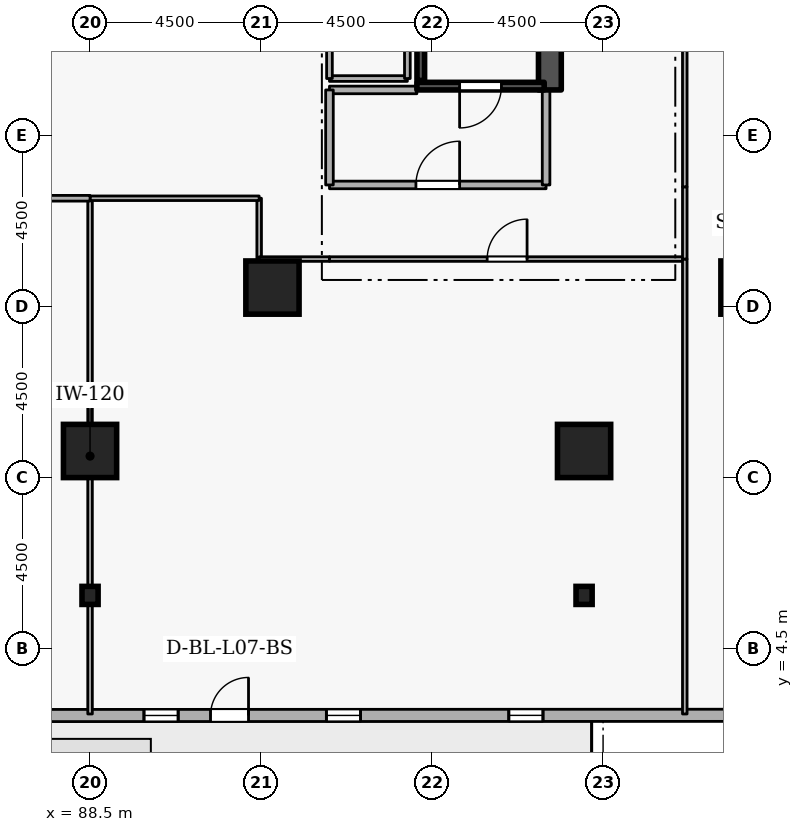
"""IFC4 building model, lengths in metres.
Left out: names, types, materials, properties, quantities, classifications, styles, units other than length and angle.
Written with IfcOpenShell. Run it as: python <this file> out.ifc"""

import sys

from ifc_helpers import new_model, si_unit, direction, frame, frame_2d, origin, origin_2d, place, context, subcontext, project, spatial, rectangle, i_section, extrude, element, fill, save


model = new_model("IFC4")
c1 = context("Model", 3, precision=1e-05, world=origin(), true_north=direction((0.0, 1.0)))
c2 = subcontext(c1, "Body", "Model", "MODEL_VIEW")
j1 = project(units=[si_unit("LENGTHUNIT", "METRE"), si_unit("PLANEANGLEUNIT", "RADIAN")], contexts=[c1])
p1 = place(None, origin())
s1 = spatial("IfcSite", under=j1, at=p1, CompositionType="ELEMENT")
p2 = place(p1, origin())
s2 = spatial("IfcBuilding", under=s1, at=p2, CompositionType="ELEMENT")
p3 = place(p2, frame((0.0, 0.0, 31.5)))
s3 = spatial("IfcBuildingStorey", under=s2, at=p3, CompositionType="ELEMENT", Elevation=31.5)
p4 = place(p3, frame((100.6, 19.2, 0.0), z_axis=(0.0, 0.0, 1.0), x_axis=(0.0, 1.0, 0.0)))
e1 = element("IfcWall", 1, at=p4, inside=s3, PredefinedType="SHEAR", context=c2, shape_type="SweptSolid", body=[
    extrude(rectangle(XDim=15.6, YDim=0.6, at=frame_2d((7.8, 0.0))), origin(), (0.0, 0.0, 1.0), 3.6),
])
for number, where, z_axis, x_axis in (
    (2, (105.8, 14.0, 0.0), (0.0, 0.0, 1.0), (1.0, 0.0, 0.0)),
    (3, (101.5, 9.7, 0.0), (0.0, 0.0, 1.0), (1.0, 0.0, 0.0)),
    (4, (88.5, 9.7, 0.0), (0.0, 0.0, 1.0), (1.0, 0.0, 0.0)),
    (5, (93.3, 14.0, 0.0), (0.0, 0.0, 1.0), (1.0, 0.0, 0.0)),
):
    element("IfcColumn", number, at=place(p3, frame(where, z_axis=z_axis, x_axis=x_axis)), inside=s3, PredefinedType="COLUMN", context=c2, shape_type="SweptSolid", body=[
        extrude(rectangle(XDim=1.4, YDim=1.4, at=origin_2d()), origin(), (0.0, 0.0, 1.0), 3.6),
    ])
for number, where, z_axis, x_axis in (
    (6, (101.5, 5.9, 0.0), (0.0, 0.0, 1.0), (1.0, 0.0, 0.0)),
    (7, (88.5, 5.9, 0.0), (0.0, 0.0, 1.0), (1.0, 0.0, 0.0)),
):
    element("IfcColumn", number, at=place(p3, frame(where, z_axis=z_axis, x_axis=x_axis)), inside=s3, PredefinedType="COLUMN", context=c2, shape_type="SweptSolid", body=[
        extrude(i_section(OverallWidth=0.424, OverallDepth=0.475, WebThickness=0.048, FlangeThickness=0.077, FilletRadius=0.015, at=origin_2d()), origin(), (0.0, 0.0, 1.0), 3.6),
    ])
p5 = place(p3, frame((72.819, 2.735, 0.0), z_axis=(0.0, 0.0, 1.0), x_axis=(0.999999952618, 0.000307837676, 0.0)))
e8 = element("IfcWall", 8, at=p5, inside=s3, PredefinedType="STANDARD", context=c2, shape_type="SweptSolid", body=[
    extrude(rectangle(XDim=34.103, YDim=0.32, at=frame_2d((17.051, 0.0))), origin(), (0.0, 0.0, 1.0), 2.7),
])
p6 = place(p5, frame((18.851, 0.0, 0.0)))
e9 = element("IfcOpeningElement", 9, at=p6, cuts=e8, PredefinedType="OPENING", context=c2, shape_type="SweptSolid", body=[
    extrude(rectangle(XDim=1.0, YDim=2.08, at=frame_2d((0.5, 1.04))), frame((0.0, 0.17, 0.0), z_axis=(0.0, -1.0, 0.0), x_axis=(1.0, 0.0, 0.0)), (0.0, 0.0, 1.0), 0.34),
])
p7 = place(p5, frame((2.7, 0.0, 0.72)))
e10 = element("IfcOpeningElement", 10, at=p7, cuts=e8, PredefinedType="OPENING", context=c2, shape_type="SweptSolid", body=[
    extrude(rectangle(XDim=0.9, YDim=1.75, at=frame_2d((0.45, 0.875))), frame((0.0, 0.17, 0.0), z_axis=(0.0, -1.0, 0.0), x_axis=(1.0, 0.0, 0.0)), (0.0, 0.0, 1.0), 0.34),
])
p8 = place(p5, frame((7.5, 0.0, 0.72)))
e11 = element("IfcOpeningElement", 11, at=p8, cuts=e8, PredefinedType="OPENING", context=c2, shape_type="SweptSolid", body=[
    extrude(rectangle(XDim=0.9, YDim=1.75, at=frame_2d((0.45, 0.875))), frame((0.0, 0.17, 0.0), z_axis=(0.0, -1.0, 0.0), x_axis=(1.0, 0.0, 0.0)), (0.0, 0.0, 1.0), 0.34),
])
p9 = place(p5, frame((12.3, 0.0, 0.72)))
e12 = element("IfcOpeningElement", 12, at=p9, cuts=e8, PredefinedType="OPENING", context=c2, shape_type="SweptSolid", body=[
    extrude(rectangle(XDim=0.9, YDim=1.75, at=frame_2d((0.45, 0.875))), frame((0.0, 0.17, 0.0), z_axis=(0.0, -1.0, 0.0), x_axis=(1.0, 0.0, 0.0)), (0.0, 0.0, 1.0), 0.34),
])
p10 = place(p5, frame((17.1, 0.0, 0.72)))
e13 = element("IfcOpeningElement", 13, at=p10, cuts=e8, PredefinedType="OPENING", context=c2, shape_type="SweptSolid", body=[
    extrude(rectangle(XDim=0.9, YDim=1.75, at=frame_2d((0.45, 0.875))), frame((0.0, 0.17, 0.0), z_axis=(0.0, -1.0, 0.0), x_axis=(1.0, 0.0, 0.0)), (0.0, 0.0, 1.0), 0.34),
])
p11 = place(p5, frame((21.9, 0.0, 0.72)))
e14 = element("IfcOpeningElement", 14, at=p11, cuts=e8, PredefinedType="OPENING", context=c2, shape_type="SweptSolid", body=[
    extrude(rectangle(XDim=0.9, YDim=1.75, at=frame_2d((0.45, 0.875))), frame((0.0, 0.17, 0.0), z_axis=(0.0, -1.0, 0.0), x_axis=(1.0, 0.0, 0.0)), (0.0, 0.0, 1.0), 0.34),
])
p12 = place(p5, frame((26.7, 0.0, 0.72)))
e15 = element("IfcOpeningElement", 15, at=p12, cuts=e8, PredefinedType="OPENING", context=c2, shape_type="SweptSolid", body=[
    extrude(rectangle(XDim=0.9, YDim=1.75, at=frame_2d((0.45, 0.875))), frame((0.0, 0.17, 0.0), z_axis=(0.0, -1.0, 0.0), x_axis=(1.0, 0.0, 0.0)), (0.0, 0.0, 1.0), 0.34),
])
p13 = place(p3, frame((100.45, 19.3, 0.0), z_axis=(0.0, 0.0, 1.0), x_axis=(-1.0, 0.0, 0.0)))
e16 = element("IfcWall", 16, at=p13, inside=s3, PredefinedType="SHEAR", context=c2, shape_type="SweptSolid", body=[
    extrude(rectangle(XDim=3.35, YDim=0.2, at=frame_2d((1.675, 0.0))), origin(), (0.0, 0.0, 1.0), 3.6),
])
p14 = place(p13, frame((1.125, 0.0, 0.0)))
e17 = element("IfcOpeningElement", 17, at=p14, cuts=e16, PredefinedType="OPENING", context=c2, shape_type="SweptSolid", body=[
    extrude(rectangle(XDim=1.1, YDim=2.1, at=frame_2d((0.55, 1.05))), frame((0.0, 0.11, 0.0), z_axis=(0.0, -1.0, 0.0), x_axis=(1.0, 0.0, 0.0)), (0.0, 0.0, 1.0), 0.22),
])
p15 = place(p3, frame((97.203, 26.55, 0.0), z_axis=(0.0, 0.0, 1.0), x_axis=(0.0, -1.0, 0.0)))
e18 = element("IfcWall", 18, at=p15, inside=s3, PredefinedType="SHEAR", context=c2, shape_type="SweptSolid", body=[
    extrude(rectangle(XDim=7.1, YDim=0.2, at=frame_2d((3.55, 0.0))), origin(), (0.0, 0.0, 1.0), 3.6),
])
p16 = place(p3, frame((94.8, 16.7, 0.0), z_axis=(0.0, 0.0, 1.0), x_axis=(1.0, 0.0, 0.0)))
e19 = element("IfcWall", 19, at=p16, inside=s3, PredefinedType="STANDARD", context=c2, shape_type="SweptSolid", body=[
    extrude(rectangle(XDim=5.7, YDim=0.2, at=frame_2d((2.85, 0.0))), origin(), (0.0, 0.0, 1.0), 3.34),
])
p17 = place(p16, frame((2.275, 0.0, 0.0)))
e20 = element("IfcOpeningElement", 20, at=p17, cuts=e19, PredefinedType="OPENING", context=c2, shape_type="SweptSolid", body=[
    extrude(rectangle(XDim=1.15, YDim=2.1, at=frame_2d((0.575, 1.05))), frame((0.0, 0.11, 0.0), z_axis=(0.0, -1.0, 0.0), x_axis=(1.0, 0.0, 0.0)), (0.0, 0.0, 1.0), 0.22),
])
p18 = place(p3, frame((100.5, 16.7, 0.0), z_axis=(0.0, 0.0, 1.0), x_axis=(0.0, 1.0, 0.0)))
e21 = element("IfcWall", 21, at=p18, inside=s3, PredefinedType="STANDARD", context=c2, shape_type="SweptSolid", body=[
    extrude(rectangle(XDim=2.5, YDim=0.2, at=frame_2d((1.25, 0.0))), origin(), (0.0, 0.0, 1.0), 3.34),
])
p19 = place(p3, frame((97.1, 19.2, 0.0), z_axis=(0.0, 0.0, 1.0), x_axis=(-1.0, 0.0, 0.0)))
e22 = element("IfcWall", 22, at=p19, inside=s3, PredefinedType="STANDARD", context=c2, shape_type="SweptSolid", body=[
    extrude(rectangle(XDim=2.3, YDim=0.2, at=frame_2d((1.15, 0.0))), origin(), (0.0, 0.0, 1.0), 2.545),
])
p20 = place(p3, frame((94.8, 19.2, 0.0), z_axis=(0.0, 0.0, 1.0), x_axis=(0.0, -1.0, 0.0)))
e23 = element("IfcWall", 23, at=p20, inside=s3, PredefinedType="STANDARD", context=c2, shape_type="SweptSolid", body=[
    extrude(rectangle(XDim=2.5, YDim=0.2, at=frame_2d((1.25, 0.0))), origin(), (0.0, 0.0, 1.0), 3.34),
])
p21 = place(p3, frame((94.8, 19.5, 0.0), z_axis=(0.0, 0.0, 1.0), x_axis=(1.0, 0.0, 0.0)))
e24 = element("IfcWall", 24, at=p21, inside=s3, PredefinedType="PARTITIONING", context=c2, shape_type="SweptSolid", body=[
    extrude(rectangle(XDim=2.05, YDim=0.15, at=frame_2d((1.025, 0.0))), origin(), (0.0, 0.0, 1.0), 2.545),
])
p22 = place(p3, frame((96.85, 19.5, 0.0), z_axis=(0.0, 0.0, 1.0), x_axis=(0.0, 1.0, 0.0)))
e25 = element("IfcWall", 25, at=p22, inside=s3, PredefinedType="PARTITIONING", context=c2, shape_type="SweptSolid", body=[
    extrude(rectangle(XDim=2.6, YDim=0.15, at=frame_2d((1.3, 0.0))), origin(), (0.0, 0.0, 1.0), 3.34),
])
p23 = place(p3, frame((94.8, 22.1, 0.0), z_axis=(0.0, 0.0, 1.0), x_axis=(0.0, -1.0, 0.0)))
e26 = element("IfcWall", 26, at=p23, inside=s3, PredefinedType="PARTITIONING", context=c2, shape_type="SweptSolid", body=[
    extrude(rectangle(XDim=2.6, YDim=0.15, at=frame_2d((1.3, 0.0))), origin(), (0.0, 0.0, 1.0), 3.34),
])
p24 = place(p23, frame((0.84, 0.0, 0.0)))
e27 = element("IfcOpeningElement", 27, at=p24, cuts=e26, PredefinedType="OPENING", context=c2, shape_type="SweptSolid", body=[
    extrude(rectangle(XDim=0.92, YDim=2.08, at=frame_2d((0.46, 1.04))), frame((0.0, 0.085, 0.0), z_axis=(0.0, -1.0, 0.0), x_axis=(1.0, 0.0, 0.0)), (0.0, 0.0, 1.0), 0.17),
])
p25 = place(p3, frame((92.95, 16.35, 0.0), z_axis=(0.0, 0.0, 1.0), x_axis=(0.0, -1.0, 0.0)))
e28 = element("IfcWall", 28, at=p25, inside=s3, PredefinedType="PARTITIONING", context=c2, shape_type="SweptSolid", body=[
    extrude(rectangle(XDim=1.6, YDim=0.12, at=frame_2d((0.8, 0.0))), origin(), (0.0, 0.0, 1.0), 3.34),
])
p26 = place(p3, frame((92.95, 14.75, 0.0), z_axis=(0.0, 0.0, 1.0), x_axis=(1.0, 0.0, 0.0)))
e29 = element("IfcWall", 29, at=p26, inside=s3, PredefinedType="PARTITIONING", context=c2, shape_type="SweptSolid", body=[
    extrude(rectangle(XDim=1.85, YDim=0.12, at=frame_2d((0.925, 0.0))), origin(), (0.0, 0.0, 1.0), 3.34),
])
p27 = place(p3, frame((94.8, 14.75, 0.0), z_axis=(0.0, 0.0, 1.0), x_axis=(1.0, 0.0, 0.0)))
e30 = element("IfcWall", 30, at=p27, inside=s3, PredefinedType="PARTITIONING", context=c2, shape_type="SweptSolid", body=[
    extrude(rectangle(XDim=9.35, YDim=0.12, at=frame_2d((4.675, 0.0))), origin(), (0.0, 0.0, 1.0), 3.34),
])
p28 = place(p27, frame((4.15, 0.0, 0.0)))
e31 = element("IfcOpeningElement", 31, at=p28, cuts=e30, PredefinedType="OPENING", context=c2, shape_type="SweptSolid", body=[
    extrude(rectangle(XDim=1.05, YDim=2.1, at=frame_2d((0.525, 1.05))), frame((0.0, 0.07, 0.0), z_axis=(0.0, -1.0, 0.0), x_axis=(1.0, 0.0, 0.0)), (0.0, 0.0, 1.0), 0.14),
])
p29 = place(p3, frame((104.15, 14.75, 0.0), z_axis=(0.0, 0.0, 1.0), x_axis=(0.0, -1.0, 0.0)))
e32 = element("IfcWall", 32, at=p29, inside=s3, PredefinedType="PARTITIONING", context=c2, shape_type="SweptSolid", body=[
    extrude(rectangle(XDim=11.97, YDim=0.12, at=frame_2d((5.985, 0.0))), origin(), (0.0, 0.0, 1.0), 3.34),
])
p30 = place(p3, frame((88.5, 2.78, 0.0), z_axis=(0.0, 0.0, 1.0), x_axis=(0.0, 1.0, 0.0)))
e33 = element("IfcWall", 33, at=p30, inside=s3, PredefinedType="PARTITIONING", context=c2, shape_type="SweptSolid", body=[
    extrude(rectangle(XDim=13.57, YDim=0.12, at=frame_2d((6.785, 0.0))), origin(), (0.0, 0.0, 1.0), 2.878),
])
p31 = place(p3, frame((88.5, 16.35, 0.0), z_axis=(0.0, 0.0, 1.0), x_axis=(1.0, 0.0, 0.0)))
e34 = element("IfcWall", 34, at=p31, inside=s3, PredefinedType="PARTITIONING", context=c2, shape_type="SweptSolid", body=[
    extrude(rectangle(XDim=4.45, YDim=0.12, at=frame_2d((2.225, 0.0))), origin(), (0.0, 0.0, 1.0), 3.34),
])
p32 = place(p3, frame((84.05, 16.35, 0.0), z_axis=(0.0, 0.0, 1.0), x_axis=(1.0, 0.0, 0.0)))
e35 = element("IfcWall", 35, at=p32, inside=s3, PredefinedType="PARTITIONING", context=c2, shape_type="SweptSolid", body=[
    extrude(rectangle(XDim=4.45, YDim=0.15, at=frame_2d((2.225, 0.0))), origin(), (0.0, 0.0, 1.0), 3.34),
])
p33 = place(p32, frame((1.575, 0.0, 0.0)))
e36 = element("IfcOpeningElement", 36, at=p33, cuts=e35, PredefinedType="OPENING", context=c2, shape_type="SweptSolid", body=[
    extrude(rectangle(XDim=1.3, YDim=2.12, at=frame_2d((0.65, 1.06))), frame((0.0, 0.085, 0.0), z_axis=(0.0, -1.0, 0.0), x_axis=(1.0, 0.0, 0.0)), (0.0, 0.0, 1.0), 0.17),
])
p34 = place(p3, frame((104.15, 14.75, 0.0), z_axis=(0.0, 0.0, 1.0), x_axis=(0.0, 1.0, 0.0)))
e37 = element("IfcWall", 37, at=p34, inside=s3, PredefinedType="PARTITIONING", context=c2, shape_type="SweptSolid", body=[
    extrude(rectangle(XDim=1.9, YDim=0.12, at=frame_2d((0.95, 0.0))), origin(), (0.0, 0.0, 1.0), 3.34),
])
p35 = place(p3, frame((104.15, 16.65, 0.0), z_axis=(0.0, 0.0, 1.0), x_axis=(0.0, 1.0, 0.0)))
e38 = element("IfcWall", 38, at=p35, inside=s3, PredefinedType="PARTITIONING", context=c2, shape_type="SweptSolid", body=[
    extrude(rectangle(XDim=10.35, YDim=0.12, at=frame_2d((5.175, 0.0))), origin(), (0.0, 0.0, 1.0), 3.34),
])
p36 = place(p35, frame((4.65, 0.0, 0.0)))
e39 = element("IfcOpeningElement", 39, at=p36, cuts=e38, PredefinedType="OPENING", context=c2, shape_type="SweptSolid", body=[
    extrude(rectangle(XDim=1.05, YDim=2.1, at=frame_2d((0.525, 1.05))), frame((0.0, 0.07, 0.0), z_axis=(0.0, -1.0, 0.0), x_axis=(1.0, 0.0, 0.0)), (0.0, 0.0, 1.0), 0.14),
])
p37 = place(p6, origin())
e40 = element("IfcDoor", 40, at=p37, inside=s3, OperationType="SINGLE_SWING_RIGHT", PredefinedType="DOOR", context=c2, shape_type="SweptSolid", body=[
    extrude(rectangle(XDim=1.0, YDim=2.08, at=frame_2d((0.5, 1.04))), frame((0.0, 0.025, 0.0), z_axis=(0.0, -1.0, 0.0), x_axis=(1.0, 0.0, 0.0)), (0.0, 0.0, 1.0), 0.05),
])
fill(e9, e40)
p38 = place(p10, origin())
e41 = element("IfcWindow", 41, at=p38, inside=s3, PartitioningType="SINGLE_PANEL", PredefinedType="WINDOW", context=c2, shape_type="SweptSolid", body=[
    extrude(rectangle(XDim=0.9, YDim=1.75, at=frame_2d((0.45, 0.875))), frame((0.0, 0.03, 0.0), z_axis=(0.0, -1.0, 0.0), x_axis=(1.0, 0.0, 0.0)), (0.0, 0.0, 1.0), 0.06),
])
fill(e13, e41)
p39 = place(p11, origin())
e42 = element("IfcWindow", 42, at=p39, inside=s3, PartitioningType="SINGLE_PANEL", PredefinedType="WINDOW", context=c2, shape_type="SweptSolid", body=[
    extrude(rectangle(XDim=0.9, YDim=1.75, at=frame_2d((0.45, 0.875))), frame((0.0, 0.03, 0.0), z_axis=(0.0, -1.0, 0.0), x_axis=(1.0, 0.0, 0.0)), (0.0, 0.0, 1.0), 0.06),
])
fill(e14, e42)
p40 = place(p12, origin())
e43 = element("IfcWindow", 43, at=p40, inside=s3, PartitioningType="SINGLE_PANEL", PredefinedType="WINDOW", context=c2, shape_type="SweptSolid", body=[
    extrude(rectangle(XDim=0.9, YDim=1.75, at=frame_2d((0.45, 0.875))), frame((0.0, 0.03, 0.0), z_axis=(0.0, -1.0, 0.0), x_axis=(1.0, 0.0, 0.0)), (0.0, 0.0, 1.0), 0.06),
])
fill(e15, e43)
p41 = place(p14, origin())
e44 = element("IfcDoor", 44, at=p41, inside=s3, OperationType="SINGLE_SWING_RIGHT", PredefinedType="DOOR", context=c2, shape_type="SweptSolid", body=[
    extrude(rectangle(XDim=1.1, YDim=2.1, at=frame_2d((0.55, 1.05))), frame((0.0, 0.025, 0.0), z_axis=(0.0, -1.0, 0.0), x_axis=(1.0, 0.0, 0.0)), (0.0, 0.0, 1.0), 0.05),
])
fill(e17, e44)
p42 = place(p17, origin())
e45 = element("IfcDoor", 45, at=p42, inside=s3, OperationType="SINGLE_SWING_RIGHT", PredefinedType="DOOR", context=c2, shape_type="SweptSolid", body=[
    extrude(rectangle(XDim=1.15, YDim=2.1, at=frame_2d((0.575, 1.05))), frame((0.0, 0.025, 0.0), z_axis=(0.0, -1.0, 0.0), x_axis=(1.0, 0.0, 0.0)), (0.0, 0.0, 1.0), 0.05),
])
fill(e20, e45)
p43 = place(p28, origin())
e46 = element("IfcDoor", 46, at=p43, inside=s3, OperationType="SINGLE_SWING_RIGHT", PredefinedType="DOOR", context=c2, shape_type="SweptSolid", body=[
    extrude(rectangle(XDim=1.05, YDim=2.1, at=frame_2d((0.525, 1.05))), frame((0.0, 0.025, 0.0), z_axis=(0.0, -1.0, 0.0), x_axis=(1.0, 0.0, 0.0)), (0.0, 0.0, 1.0), 0.05),
])
fill(e31, e46)
save(model, sys.argv[1])
